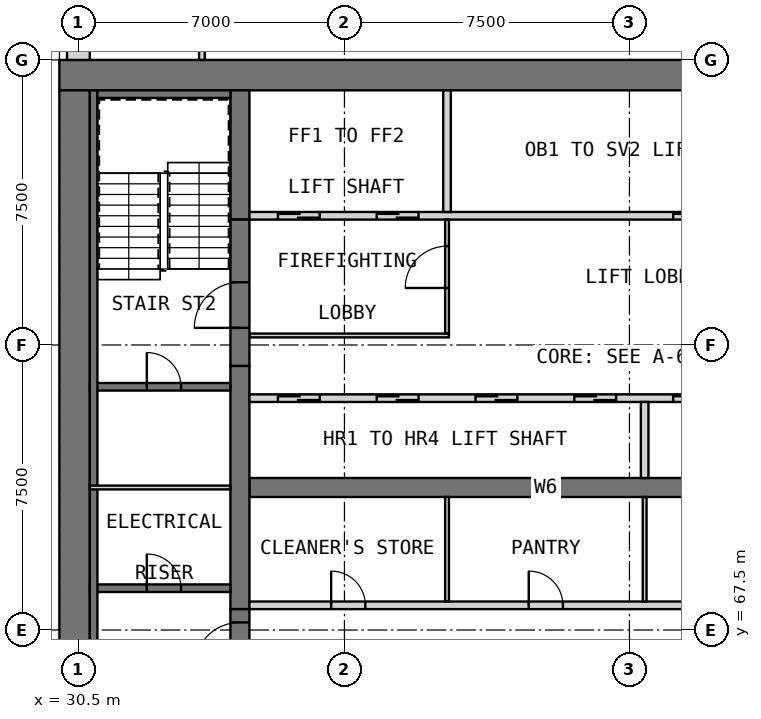
"""IFC4 building model, lengths in metres.
Left out: names, types, materials, properties, quantities, classifications, styles, units other than length and angle.
Written with IfcOpenShell. Run it as: python <this file> out.ifc"""

import sys

from ifc_helpers import new_model, si_unit, direction, frame, frame_2d, origin, place, context, subcontext, project, spatial, rectangle, extrude, element, fill, save


model = new_model("IFC4")
c1 = context("Model", 3, precision=1e-05, world=origin(), true_north=direction((0.0, 1.0)))
c2 = subcontext(c1, "Body", "Model", "MODEL_VIEW")
j1 = project(units=[si_unit("LENGTHUNIT", "METRE"), si_unit("PLANEANGLEUNIT", "RADIAN")], contexts=[c1])
p1 = place(None, origin())
s1 = spatial("IfcSite", under=j1, at=p1, CompositionType="ELEMENT")
p2 = place(p1, origin())
s2 = spatial("IfcBuilding", under=s1, at=p2, CompositionType="ELEMENT")
p3 = place(p2, frame((0.0, 0.0, 182.7)))
s3 = spatial("IfcBuildingStorey", under=s2, at=p3, CompositionType="ELEMENT", Elevation=182.7)
p4 = place(p3, frame((30.0, 82.1, 0.0), z_axis=(0.0, 0.0, 1.0), x_axis=(1.0, 0.0, 0.0)))
e1 = element("IfcWall", 1, at=p4, inside=s3, PredefinedType="SHEAR", context=c2, shape_type="SweptSolid", body=[
    extrude(rectangle(XDim=30.0, YDim=0.8, at=frame_2d((15.0, 0.0))), origin(), (0.0, 0.0, 1.0), 3.5),
])
p5 = place(p3, frame((30.4, 60.8, 0.0), z_axis=(0.0, 0.0, 1.0), x_axis=(0.0, 1.0, 0.0)))
e2 = element("IfcWall", 2, at=p5, inside=s3, PredefinedType="SHEAR", context=c2, shape_type="SweptSolid", body=[
    extrude(rectangle(XDim=20.9, YDim=0.8, at=frame_2d((10.45, 0.0))), origin(), (0.0, 0.0, 1.0), 3.5),
])
p6 = place(p3, frame((35.0, 71.25, 0.0), z_axis=(0.0, 0.0, 1.0), x_axis=(1.0, 0.0, 0.0)))
e3 = element("IfcWall", 3, at=p6, inside=s3, PredefinedType="SHEAR", context=c2, shape_type="SweptSolid", body=[
    extrude(rectangle(XDim=15.6, YDim=0.5, at=frame_2d((7.8, 0.0))), origin(), (0.0, 0.0, 1.0), 3.5),
])
p7 = place(p3, frame((34.75, 68.05, 0.0), z_axis=(0.0, 0.0, 1.0), x_axis=(0.0, 1.0, 0.0)))
e4 = element("IfcWall", 4, at=p7, inside=s3, PredefinedType="SHEAR", context=c2, shape_type="SweptSolid", body=[
    extrude(rectangle(XDim=6.4, YDim=0.5, at=frame_2d((3.2, 0.0))), origin(), (0.0, 0.0, 1.0), 3.5),
])
p8 = place(p3, frame((34.75, 78.3, 0.0), z_axis=(0.0, 0.0, 1.0), x_axis=(0.0, 1.0, 0.0)))
e5 = element("IfcWall", 5, at=p8, inside=s3, PredefinedType="SHEAR", context=c2, shape_type="SweptSolid", body=[
    extrude(rectangle(XDim=3.4, YDim=0.5, at=frame_2d((1.7, 0.0))), origin(), (0.0, 0.0, 1.0), 3.5),
])
p9 = place(p2, frame((0.0, 0.0, 34.0)))
s4 = spatial("IfcBuildingStorey", under=s2, at=p9, CompositionType="ELEMENT", Elevation=34.0)
for number, where, z_axis, x_axis in (
    (6, (29.7, 70.8, 0.0), (0.0, 0.0, 1.0), (0.0, 1.0, 0.0)),
    (7, (29.7, 75.675, 0.0), (0.0, 0.0, 1.0), (0.0, 1.0, 0.0)),
    (8, (29.7, 80.55, 0.0), (0.0, 0.0, 1.0), (0.0, 1.0, 0.0)),
):
    element("IfcWall", number, at=place(p9, frame(where, z_axis=z_axis, x_axis=x_axis)), inside=s4, PredefinedType="SOLIDWALL", context=c2, shape_type="SweptSolid", body=[
        extrude(rectangle(XDim=0.9, YDim=0.6, at=frame_2d((0.45, 0.0))), origin(), (0.0, 0.0, 1.0), 286.2),
    ])
p10 = place(p3, frame((30.5, 89.5, 0.0), z_axis=(0.0, 0.0, 1.0), x_axis=(0.0, -1.0, 0.0)))
e9 = element("IfcWall", 9, at=p10, inside=s3, PredefinedType="SOLIDWALL", context=c2, shape_type="SweptSolid", body=[
    extrude(rectangle(XDim=7.0, YDim=0.6, at=frame_2d((3.5, 0.0))), origin(), (0.0, 0.0, 1.0), 3.25),
])
p11 = place(p10, frame((3.925, 0.0, 0.8)))
e10 = element("IfcOpeningElement", 10, at=p11, cuts=e9, PredefinedType="OPENING", context=c2, shape_type="SweptSolid", body=[
    extrude(rectangle(XDim=2.4, YDim=1.8, at=frame_2d((1.2, 0.9))), frame((0.0, 0.31, 0.0), z_axis=(0.0, -1.0, 0.0), x_axis=(1.0, 0.0, 0.0)), (0.0, 0.0, 1.0), 0.62),
])
p12 = place(p10, frame((0.425, 0.0, 0.8)))
e11 = element("IfcOpeningElement", 11, at=p12, cuts=e9, PredefinedType="OPENING", context=c2, shape_type="SweptSolid", body=[
    extrude(rectangle(XDim=2.4, YDim=1.8, at=frame_2d((1.2, 0.9))), frame((0.0, 0.31, 0.0), z_axis=(0.0, -1.0, 0.0), x_axis=(1.0, 0.0, 0.0)), (0.0, 0.0, 1.0), 0.62),
])
p13 = place(p3, frame((35.0, 68.15, 0.0), z_axis=(0.0, 0.0, 1.0), x_axis=(1.0, 0.0, 0.0)))
e12 = element("IfcWall", 12, at=p13, inside=s3, PredefinedType="PARTITIONING", context=c2, shape_type="SweptSolid", body=[
    extrude(rectangle(XDim=15.6, YDim=0.2, at=frame_2d((7.8, 0.0))), origin(), (0.0, 0.0, 1.0), 3.25),
])
p14 = place(p13, frame((2.15, 0.0, 0.0)))
e13 = element("IfcOpeningElement", 13, at=p14, cuts=e12, PredefinedType="OPENING", context=c2, shape_type="SweptSolid", body=[
    extrude(rectangle(XDim=0.9, YDim=2.1, at=frame_2d((0.45, 1.05))), frame((0.0, 0.11, 0.0), z_axis=(0.0, -1.0, 0.0), x_axis=(1.0, 0.0, 0.0)), (0.0, 0.0, 1.0), 0.22),
])
p15 = place(p13, frame((7.35, 0.0, 0.0)))
e14 = element("IfcOpeningElement", 14, at=p15, cuts=e12, PredefinedType="OPENING", context=c2, shape_type="SweptSolid", body=[
    extrude(rectangle(XDim=0.9, YDim=2.1, at=frame_2d((0.45, 1.05))), frame((0.0, 0.11, 0.0), z_axis=(0.0, -1.0, 0.0), x_axis=(1.0, 0.0, 0.0)), (0.0, 0.0, 1.0), 0.22),
])
p16 = place(p13, frame((12.55, 0.0, 0.0)))
e15 = element("IfcOpeningElement", 15, at=p16, cuts=e12, PredefinedType="OPENING", context=c2, shape_type="SweptSolid", body=[
    extrude(rectangle(XDim=0.9, YDim=2.1, at=frame_2d((0.45, 1.05))), frame((0.0, 0.11, 0.0), z_axis=(0.0, -1.0, 0.0), x_axis=(1.0, 0.0, 0.0)), (0.0, 0.0, 1.0), 0.22),
])
for number, where, z_axis, x_axis in (
    (16, (40.2, 68.25, 0.0), (0.0, 0.0, 1.0), (0.0, 1.0, 0.0)),
    (17, (45.4, 68.25, 0.0), (0.0, 0.0, 1.0), (0.0, 1.0, 0.0)),
):
    element("IfcWall", number, at=place(p3, frame(where, z_axis=z_axis, x_axis=x_axis)), inside=s3, PredefinedType="PARTITIONING", context=c2, shape_type="SweptSolid", body=[
        extrude(rectangle(XDim=2.75, YDim=0.1, at=frame_2d((1.375, 0.0))), origin(), (0.0, 0.0, 1.0), 3.25),
    ])
p17 = place(p3, frame((35.0, 73.6, 0.0), z_axis=(0.0, 0.0, 1.0), x_axis=(1.0, 0.0, 0.0)))
e18 = element("IfcWall", 18, at=p17, inside=s3, PredefinedType="SOLIDWALL", context=c2, shape_type="SweptSolid", body=[
    extrude(rectangle(XDim=15.6, YDim=0.2, at=frame_2d((7.8, 0.0))), origin(), (0.0, 0.0, 1.0), 3.5),
])
p18 = place(p17, frame((0.75, 0.0, 0.0)))
e19 = element("IfcOpeningElement", 19, at=p18, cuts=e18, PredefinedType="OPENING", context=c2, shape_type="SweptSolid", body=[
    extrude(rectangle(XDim=1.1, YDim=2.1, at=frame_2d((0.55, 1.05))), frame((0.0, 0.11, 0.0), z_axis=(0.0, -1.0, 0.0), x_axis=(1.0, 0.0, 0.0)), (0.0, 0.0, 1.0), 0.22),
])
p19 = place(p17, frame((3.35, 0.0, 0.0)))
e20 = element("IfcOpeningElement", 20, at=p19, cuts=e18, PredefinedType="OPENING", context=c2, shape_type="SweptSolid", body=[
    extrude(rectangle(XDim=1.1, YDim=2.1, at=frame_2d((0.55, 1.05))), frame((0.0, 0.11, 0.0), z_axis=(0.0, -1.0, 0.0), x_axis=(1.0, 0.0, 0.0)), (0.0, 0.0, 1.0), 0.22),
])
p20 = place(p17, frame((5.95, 0.0, 0.0)))
e21 = element("IfcOpeningElement", 21, at=p20, cuts=e18, PredefinedType="OPENING", context=c2, shape_type="SweptSolid", body=[
    extrude(rectangle(XDim=1.1, YDim=2.1, at=frame_2d((0.55, 1.05))), frame((0.0, 0.11, 0.0), z_axis=(0.0, -1.0, 0.0), x_axis=(1.0, 0.0, 0.0)), (0.0, 0.0, 1.0), 0.22),
])
p21 = place(p17, frame((8.55, 0.0, 0.0)))
e22 = element("IfcOpeningElement", 22, at=p21, cuts=e18, PredefinedType="OPENING", context=c2, shape_type="SweptSolid", body=[
    extrude(rectangle(XDim=1.1, YDim=2.1, at=frame_2d((0.55, 1.05))), frame((0.0, 0.11, 0.0), z_axis=(0.0, -1.0, 0.0), x_axis=(1.0, 0.0, 0.0)), (0.0, 0.0, 1.0), 0.22),
])
p22 = place(p17, frame((11.15, 0.0, 0.0)))
e23 = element("IfcOpeningElement", 23, at=p22, cuts=e18, PredefinedType="OPENING", context=c2, shape_type="SweptSolid", body=[
    extrude(rectangle(XDim=1.1, YDim=2.1, at=frame_2d((0.55, 1.05))), frame((0.0, 0.11, 0.0), z_axis=(0.0, -1.0, 0.0), x_axis=(1.0, 0.0, 0.0)), (0.0, 0.0, 1.0), 0.22),
])
p23 = place(p17, frame((13.75, 0.0, 0.0)))
e24 = element("IfcOpeningElement", 24, at=p23, cuts=e18, PredefinedType="OPENING", context=c2, shape_type="SweptSolid", body=[
    extrude(rectangle(XDim=1.1, YDim=2.1, at=frame_2d((0.55, 1.05))), frame((0.0, 0.11, 0.0), z_axis=(0.0, -1.0, 0.0), x_axis=(1.0, 0.0, 0.0)), (0.0, 0.0, 1.0), 0.22),
])
p24 = place(p3, frame((45.4, 71.5, 0.0), z_axis=(0.0, 0.0, 1.0), x_axis=(0.0, 1.0, 0.0)))
e25 = element("IfcWall", 25, at=p24, inside=s3, PredefinedType="SOLIDWALL", context=c2, shape_type="SweptSolid", body=[
    extrude(rectangle(XDim=2.0, YDim=0.2, at=frame_2d((1.0, 0.0))), origin(), (0.0, 0.0, 1.0), 3.5),
])
p25 = place(p3, frame((35.0, 78.4, 0.0), z_axis=(0.0, 0.0, 1.0), x_axis=(1.0, 0.0, 0.0)))
e26 = element("IfcWall", 26, at=p25, inside=s3, PredefinedType="SOLIDWALL", context=c2, shape_type="SweptSolid", body=[
    extrude(rectangle(XDim=15.6, YDim=0.2, at=frame_2d((7.8, 0.0))), origin(), (0.0, 0.0, 1.0), 3.5),
])
p26 = place(p25, frame((0.75, 0.0, 0.0)))
e27 = element("IfcOpeningElement", 27, at=p26, cuts=e26, PredefinedType="OPENING", context=c2, shape_type="SweptSolid", body=[
    extrude(rectangle(XDim=1.1, YDim=2.1, at=frame_2d((0.55, 1.05))), frame((0.0, 0.11, 0.0), z_axis=(0.0, -1.0, 0.0), x_axis=(1.0, 0.0, 0.0)), (0.0, 0.0, 1.0), 0.22),
])
p27 = place(p25, frame((3.35, 0.0, 0.0)))
e28 = element("IfcOpeningElement", 28, at=p27, cuts=e26, PredefinedType="OPENING", context=c2, shape_type="SweptSolid", body=[
    extrude(rectangle(XDim=1.1, YDim=2.1, at=frame_2d((0.55, 1.05))), frame((0.0, 0.11, 0.0), z_axis=(0.0, -1.0, 0.0), x_axis=(1.0, 0.0, 0.0)), (0.0, 0.0, 1.0), 0.22),
])
p28 = place(p25, frame((11.15, 0.0, 0.0)))
e29 = element("IfcOpeningElement", 29, at=p28, cuts=e26, PredefinedType="OPENING", context=c2, shape_type="SweptSolid", body=[
    extrude(rectangle(XDim=1.1, YDim=2.1, at=frame_2d((0.55, 1.05))), frame((0.0, 0.11, 0.0), z_axis=(0.0, -1.0, 0.0), x_axis=(1.0, 0.0, 0.0)), (0.0, 0.0, 1.0), 0.22),
])
p29 = place(p25, frame((13.75, 0.0, 0.0)))
e30 = element("IfcOpeningElement", 30, at=p29, cuts=e26, PredefinedType="OPENING", context=c2, shape_type="SweptSolid", body=[
    extrude(rectangle(XDim=1.1, YDim=2.1, at=frame_2d((0.55, 1.05))), frame((0.0, 0.11, 0.0), z_axis=(0.0, -1.0, 0.0), x_axis=(1.0, 0.0, 0.0)), (0.0, 0.0, 1.0), 0.22),
])
p30 = place(p3, frame((40.2, 78.5, 0.0), z_axis=(0.0, 0.0, 1.0), x_axis=(0.0, 1.0, 0.0)))
e31 = element("IfcWall", 31, at=p30, inside=s3, PredefinedType="SOLIDWALL", context=c2, shape_type="SweptSolid", body=[
    extrude(rectangle(XDim=3.2, YDim=0.2, at=frame_2d((1.6, 0.0))), origin(), (0.0, 0.0, 1.0), 3.5),
])
p31 = place(p3, frame((35.0, 75.25, 0.0), z_axis=(0.0, 0.0, 1.0), x_axis=(1.0, 0.0, 0.0)))
e32 = element("IfcWall", 32, at=p31, inside=s3, PredefinedType="PARTITIONING", context=c2, shape_type="SweptSolid", body=[
    extrude(rectangle(XDim=5.25, YDim=0.1, at=frame_2d((2.625, 0.0))), origin(), (0.0, 0.0, 1.0), 3.25),
])
p32 = place(p3, frame((40.2, 75.3, 0.0), z_axis=(0.0, 0.0, 1.0), x_axis=(0.0, 1.0, 0.0)))
e33 = element("IfcWall", 33, at=p32, inside=s3, PredefinedType="PARTITIONING", context=c2, shape_type="SweptSolid", body=[
    extrude(rectangle(XDim=3.0, YDim=0.1, at=frame_2d((1.5, 0.0))), origin(), (0.0, 0.0, 1.0), 3.25),
])
p33 = place(p32, frame((1.2, 0.0, 0.0)))
e34 = element("IfcOpeningElement", 34, at=p33, cuts=e33, PredefinedType="OPENING", context=c2, shape_type="SweptSolid", body=[
    extrude(rectangle(XDim=1.1, YDim=2.1, at=frame_2d((0.55, 1.05))), frame((0.0, 0.06, 0.0), z_axis=(0.0, -1.0, 0.0), x_axis=(1.0, 0.0, 0.0)), (0.0, 0.0, 1.0), 0.12),
])
p34 = place(p3, frame((34.75, 64.2, 0.0), z_axis=(0.0, 0.0, 1.0), x_axis=(0.0, 1.0, 0.0)))
e35 = element("IfcWall", 35, at=p34, inside=s3, PredefinedType="SOLIDWALL", context=c2, shape_type="SweptSolid", body=[
    extrude(rectangle(XDim=3.85, YDim=0.5, at=frame_2d((1.925, 0.0))), origin(), (0.0, 0.0, 1.0), 2.3),
])
p35 = place(p34, frame((2.3, 0.0, 0.0)))
e36 = element("IfcOpeningElement", 36, at=p35, cuts=e35, PredefinedType="OPENING", context=c2, shape_type="SweptSolid", body=[
    extrude(rectangle(XDim=1.2, YDim=2.1, at=frame_2d((0.6, 1.05))), frame((0.0, 0.26, 0.0), z_axis=(0.0, -1.0, 0.0), x_axis=(1.0, 0.0, 0.0)), (0.0, 0.0, 1.0), 0.52),
])
p36 = place(p3, frame((34.75, 74.45, 0.0), z_axis=(0.0, 0.0, 1.0), x_axis=(0.0, 1.0, 0.0)))
e37 = element("IfcWall", 37, at=p36, inside=s3, PredefinedType="SOLIDWALL", context=c2, shape_type="SweptSolid", body=[
    extrude(rectangle(XDim=3.85, YDim=0.5, at=frame_2d((1.925, 0.0))), origin(), (0.0, 0.0, 1.0), 2.3),
])
p37 = place(p36, frame((1.0, 0.0, 0.0)))
e38 = element("IfcOpeningElement", 38, at=p37, cuts=e37, PredefinedType="OPENING", context=c2, shape_type="SweptSolid", body=[
    extrude(rectangle(XDim=1.2, YDim=2.1, at=frame_2d((0.6, 1.05))), frame((0.0, 0.26, 0.0), z_axis=(0.0, -1.0, 0.0), x_axis=(1.0, 0.0, 0.0)), (0.0, 0.0, 1.0), 0.52),
])
p38 = place(p3, frame((30.8, 68.6, 0.0), z_axis=(0.0, 0.0, 1.0), x_axis=(1.0, 0.0, 0.0)))
e39 = element("IfcWall", 39, at=p38, inside=s3, PredefinedType="SOLIDWALL", context=c2, shape_type="SweptSolid", body=[
    extrude(rectangle(XDim=3.7, YDim=0.2, at=frame_2d((1.85, 0.0))), origin(), (0.0, 0.0, 1.0), 3.25),
])
p39 = place(p38, frame((1.5, 0.0, 0.0)))
e40 = element("IfcOpeningElement", 40, at=p39, cuts=e39, PredefinedType="OPENING", context=c2, shape_type="SweptSolid", body=[
    extrude(rectangle(XDim=0.9, YDim=2.1, at=frame_2d((0.45, 1.05))), frame((0.0, 0.11, 0.0), z_axis=(0.0, -1.0, 0.0), x_axis=(1.0, 0.0, 0.0)), (0.0, 0.0, 1.0), 0.22),
])
p40 = place(p3, frame((30.8, 73.9, 0.0), z_axis=(0.0, 0.0, 1.0), x_axis=(1.0, 0.0, 0.0)))
e41 = element("IfcWall", 41, at=p40, inside=s3, PredefinedType="SOLIDWALL", context=c2, shape_type="SweptSolid", body=[
    extrude(rectangle(XDim=3.7, YDim=0.2, at=frame_2d((1.85, 0.0))), origin(), (0.0, 0.0, 1.0), 3.25),
])
p41 = place(p40, frame((1.5, 0.0, 0.0)))
e42 = element("IfcOpeningElement", 42, at=p41, cuts=e41, PredefinedType="OPENING", context=c2, shape_type="SweptSolid", body=[
    extrude(rectangle(XDim=0.9, YDim=2.1, at=frame_2d((0.45, 1.05))), frame((0.0, 0.11, 0.0), z_axis=(0.0, -1.0, 0.0), x_axis=(1.0, 0.0, 0.0)), (0.0, 0.0, 1.0), 0.22),
])
p42 = place(p3, frame((30.9, 60.8, 0.0), z_axis=(0.0, 0.0, 1.0), x_axis=(0.0, 1.0, 0.0)))
e43 = element("IfcWall", 43, at=p42, inside=s3, PredefinedType="SOLIDWALL", context=c2, shape_type="SweptSolid", body=[
    extrude(rectangle(XDim=20.9, YDim=0.2, at=frame_2d((10.45, 0.0))), origin(), (0.0, 0.0, 1.0), 3.25),
])
p43 = place(p3, frame((31.0, 81.6, 0.0), z_axis=(0.0, 0.0, 1.0), x_axis=(1.0, 0.0, 0.0)))
e44 = element("IfcWall", 44, at=p43, inside=s3, PredefinedType="SOLIDWALL", context=c2, shape_type="SweptSolid", body=[
    extrude(rectangle(XDim=3.5, YDim=0.2, at=frame_2d((1.75, 0.0))), origin(), (0.0, 0.0, 1.0), 3.25),
])
p44 = place(p3, frame((30.8, 71.25, 0.0), z_axis=(0.0, 0.0, 1.0), x_axis=(1.0, 0.0, 0.0)))
e45 = element("IfcWall", 45, at=p44, inside=s3, PredefinedType="PARTITIONING", context=c2, shape_type="SweptSolid", body=[
    extrude(rectangle(XDim=3.7, YDim=0.1, at=frame_2d((1.85, 0.0))), origin(), (0.0, 0.0, 1.0), 3.25),
])
p45 = place(p3, frame((33.75, 82.5, 0.0), z_axis=(0.0, 0.0, 1.0), x_axis=(0.0, 1.0, 0.0)))
e46 = element("IfcWall", 46, at=p45, inside=s3, PredefinedType="PARTITIONING", context=c2, shape_type="SweptSolid", body=[
    extrude(rectangle(XDim=2.025, YDim=0.15, at=frame_2d((1.012, 0.0))), origin(), (0.0, 0.0, 1.0), 3.25),
])
p46 = place(p14, origin())
e47 = element("IfcDoor", 47, at=p46, inside=s3, OperationType="SINGLE_SWING_RIGHT", PredefinedType="DOOR", context=c2, shape_type="SweptSolid", body=[
    extrude(rectangle(XDim=0.9, YDim=2.1, at=frame_2d((0.45, 1.05))), frame((0.0, 0.025, 0.0), z_axis=(0.0, -1.0, 0.0), x_axis=(1.0, 0.0, 0.0)), (0.0, 0.0, 1.0), 0.05),
])
fill(e13, e47)
p47 = place(p15, origin())
e48 = element("IfcDoor", 48, at=p47, inside=s3, OperationType="SINGLE_SWING_LEFT", PredefinedType="DOOR", context=c2, shape_type="SweptSolid", body=[
    extrude(rectangle(XDim=0.9, YDim=2.1, at=frame_2d((0.45, 1.05))), frame((0.0, 0.025, 0.0), z_axis=(0.0, -1.0, 0.0), x_axis=(1.0, 0.0, 0.0)), (0.0, 0.0, 1.0), 0.05),
])
fill(e14, e48)
p48 = place(p18, origin())
e49 = element("IfcDoor", 49, at=p48, inside=s3, OperationType="DOUBLE_DOOR_SLIDING", PredefinedType="DOOR", context=c2, shape_type="SweptSolid", body=[
    extrude(rectangle(XDim=1.1, YDim=2.1, at=frame_2d((0.55, 1.05))), frame((0.0, 0.025, 0.0), z_axis=(0.0, -1.0, 0.0), x_axis=(1.0, 0.0, 0.0)), (0.0, 0.0, 1.0), 0.05),
])
fill(e19, e49)
p49 = place(p19, origin())
e50 = element("IfcDoor", 50, at=p49, inside=s3, OperationType="DOUBLE_DOOR_SLIDING", PredefinedType="DOOR", context=c2, shape_type="SweptSolid", body=[
    extrude(rectangle(XDim=1.1, YDim=2.1, at=frame_2d((0.55, 1.05))), frame((0.0, 0.025, 0.0), z_axis=(0.0, -1.0, 0.0), x_axis=(1.0, 0.0, 0.0)), (0.0, 0.0, 1.0), 0.05),
])
fill(e20, e50)
p50 = place(p20, origin())
e51 = element("IfcDoor", 51, at=p50, inside=s3, OperationType="DOUBLE_DOOR_SLIDING", PredefinedType="DOOR", context=c2, shape_type="SweptSolid", body=[
    extrude(rectangle(XDim=1.1, YDim=2.1, at=frame_2d((0.55, 1.05))), frame((0.0, 0.025, 0.0), z_axis=(0.0, -1.0, 0.0), x_axis=(1.0, 0.0, 0.0)), (0.0, 0.0, 1.0), 0.05),
])
fill(e21, e51)
p51 = place(p21, origin())
e52 = element("IfcDoor", 52, at=p51, inside=s3, OperationType="DOUBLE_DOOR_SLIDING", PredefinedType="DOOR", context=c2, shape_type="SweptSolid", body=[
    extrude(rectangle(XDim=1.1, YDim=2.1, at=frame_2d((0.55, 1.05))), frame((0.0, 0.025, 0.0), z_axis=(0.0, -1.0, 0.0), x_axis=(1.0, 0.0, 0.0)), (0.0, 0.0, 1.0), 0.05),
])
fill(e22, e52)
p52 = place(p22, origin())
e53 = element("IfcDoor", 53, at=p52, inside=s3, OperationType="DOUBLE_DOOR_SLIDING", PredefinedType="DOOR", context=c2, shape_type="SweptSolid", body=[
    extrude(rectangle(XDim=1.1, YDim=2.1, at=frame_2d((0.55, 1.05))), frame((0.0, 0.025, 0.0), z_axis=(0.0, -1.0, 0.0), x_axis=(1.0, 0.0, 0.0)), (0.0, 0.0, 1.0), 0.05),
])
fill(e23, e53)
p53 = place(p26, origin())
e54 = element("IfcDoor", 54, at=p53, inside=s3, OperationType="DOUBLE_DOOR_SLIDING", PredefinedType="DOOR", context=c2, shape_type="SweptSolid", body=[
    extrude(rectangle(XDim=1.1, YDim=2.1, at=frame_2d((0.55, 1.05))), frame((0.0, 0.025, 0.0), z_axis=(0.0, -1.0, 0.0), x_axis=(1.0, 0.0, 0.0)), (0.0, 0.0, 1.0), 0.05),
])
fill(e27, e54)
p54 = place(p27, origin())
e55 = element("IfcDoor", 55, at=p54, inside=s3, OperationType="DOUBLE_DOOR_SLIDING", PredefinedType="DOOR", context=c2, shape_type="SweptSolid", body=[
    extrude(rectangle(XDim=1.1, YDim=2.1, at=frame_2d((0.55, 1.05))), frame((0.0, 0.025, 0.0), z_axis=(0.0, -1.0, 0.0), x_axis=(1.0, 0.0, 0.0)), (0.0, 0.0, 1.0), 0.05),
])
fill(e28, e55)
p55 = place(p28, origin())
e56 = element("IfcDoor", 56, at=p55, inside=s3, OperationType="DOUBLE_DOOR_SLIDING", PredefinedType="DOOR", context=c2, shape_type="SweptSolid", body=[
    extrude(rectangle(XDim=1.1, YDim=2.1, at=frame_2d((0.55, 1.05))), frame((0.0, 0.025, 0.0), z_axis=(0.0, -1.0, 0.0), x_axis=(1.0, 0.0, 0.0)), (0.0, 0.0, 1.0), 0.05),
])
fill(e29, e56)
p56 = place(p33, origin())
e57 = element("IfcDoor", 57, at=p56, inside=s3, OperationType="SINGLE_SWING_LEFT", PredefinedType="DOOR", context=c2, shape_type="SweptSolid", body=[
    extrude(rectangle(XDim=1.1, YDim=2.1, at=frame_2d((0.55, 1.05))), frame((0.0, 0.025, 0.0), z_axis=(0.0, -1.0, 0.0), x_axis=(1.0, 0.0, 0.0)), (0.0, 0.0, 1.0), 0.05),
])
fill(e34, e57)
p57 = place(p35, origin())
e58 = element("IfcDoor", 58, at=p57, inside=s3, OperationType="SINGLE_SWING_LEFT", PredefinedType="DOOR", context=c2, shape_type="SweptSolid", body=[
    extrude(rectangle(XDim=1.2, YDim=2.1, at=frame_2d((0.6, 1.05))), frame((0.0, 0.025, 0.0), z_axis=(0.0, -1.0, 0.0), x_axis=(1.0, 0.0, 0.0)), (0.0, 0.0, 1.0), 0.05),
])
fill(e36, e58)
p58 = place(p37, origin())
e59 = element("IfcDoor", 59, at=p58, inside=s3, OperationType="SINGLE_SWING_RIGHT", PredefinedType="DOOR", context=c2, shape_type="SweptSolid", body=[
    extrude(rectangle(XDim=1.2, YDim=2.1, at=frame_2d((0.6, 1.05))), frame((0.0, 0.025, 0.0), z_axis=(0.0, -1.0, 0.0), x_axis=(1.0, 0.0, 0.0)), (0.0, 0.0, 1.0), 0.05),
])
fill(e38, e59)
p59 = place(p39, origin())
e60 = element("IfcDoor", 60, at=p59, inside=s3, OperationType="SINGLE_SWING_LEFT", PredefinedType="DOOR", context=c2, shape_type="SweptSolid", body=[
    extrude(rectangle(XDim=0.9, YDim=2.1, at=frame_2d((0.45, 1.05))), frame((0.0, 0.025, 0.0), z_axis=(0.0, -1.0, 0.0), x_axis=(1.0, 0.0, 0.0)), (0.0, 0.0, 1.0), 0.05),
])
fill(e40, e60)
p60 = place(p41, origin())
e61 = element("IfcDoor", 61, at=p60, inside=s3, OperationType="SINGLE_SWING_RIGHT", PredefinedType="DOOR", context=c2, shape_type="SweptSolid", body=[
    extrude(rectangle(XDim=0.9, YDim=2.1, at=frame_2d((0.45, 1.05))), frame((0.0, 0.025, 0.0), z_axis=(0.0, -1.0, 0.0), x_axis=(1.0, 0.0, 0.0)), (0.0, 0.0, 1.0), 0.05),
])
fill(e42, e61)
save(model, sys.argv[1])
